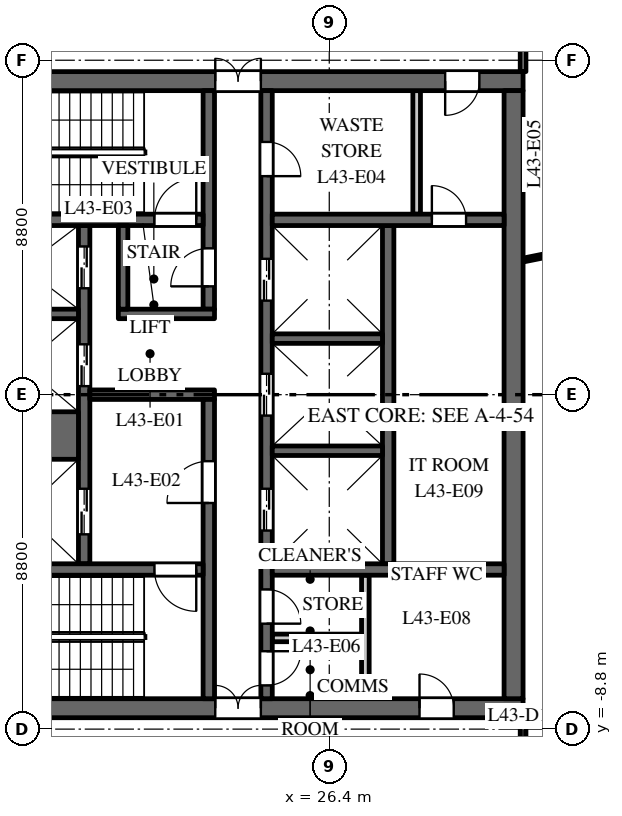
"""IFC4 building model, lengths in metres.
Left out: names, types, materials, properties, quantities, classifications, styles, units other than length and angle.
Written with IfcOpenShell. Run it as: python <this file> out.ifc"""

import sys

from ifc_helpers import new_model, si_unit, direction, frame, frame_2d, origin, place, context, subcontext, project, spatial, rectangle, extrude, element, fill, save


model = new_model("IFC4")
c1 = context("Model", 3, precision=1e-05, world=origin(), true_north=direction((0.0, 1.0)))
c2 = subcontext(c1, "Body", "Model", "MODEL_VIEW")
j1 = project(units=[si_unit("LENGTHUNIT", "METRE"), si_unit("PLANEANGLEUNIT", "RADIAN")], contexts=[c1])
p1 = place(None, origin())
s1 = spatial("IfcSite", under=j1, at=p1, CompositionType="ELEMENT")
p2 = place(p1, origin())
s2 = spatial("IfcBuilding", under=s1, at=p2, CompositionType="ELEMENT")
p3 = place(p2, frame((0.0, 0.0, 186.0)))
s3 = spatial("IfcBuildingStorey", under=s2, at=p3, CompositionType="ELEMENT", Elevation=186.0)
p4 = place(p3, frame((16.5, 8.25, 0.0), z_axis=(0.0, 0.0, 1.0), x_axis=(1.0, 0.0, 0.0)))
e1 = element("IfcWall", 1, at=p4, inside=s3, PredefinedType="SHEAR", context=c2, shape_type="SweptSolid", body=[
    extrude(rectangle(XDim=15.0, YDim=0.5, at=frame_2d((7.5, 0.0))), origin(), (0.0, 0.0, 1.0), 3.7),
])
p5 = place(p4, frame((6.9, 0.0, 0.0)))
e2 = element("IfcOpeningElement", 2, at=p5, cuts=e1, PredefinedType="OPENING", context=c2, shape_type="SweptSolid", body=[
    extrude(rectangle(XDim=1.2, YDim=2.1, at=frame_2d((0.6, 1.05))), frame((0.0, 0.26, 0.0), z_axis=(0.0, -1.0, 0.0), x_axis=(1.0, 0.0, 0.0)), (0.0, 0.0, 1.0), 0.52),
])
p6 = place(p4, frame((12.95, 0.0, 0.0)))
e3 = element("IfcOpeningElement", 3, at=p6, cuts=e1, PredefinedType="OPENING", context=c2, shape_type="SweptSolid", body=[
    extrude(rectangle(XDim=0.9, YDim=2.1, at=frame_2d((0.45, 1.05))), frame((0.0, 0.26, 0.0), z_axis=(0.0, -1.0, 0.0), x_axis=(1.0, 0.0, 0.0)), (0.0, 0.0, 1.0), 0.52),
])
p7 = place(p3, frame((16.5, -8.25, 0.0), z_axis=(0.0, 0.0, 1.0), x_axis=(1.0, 0.0, 0.0)))
e4 = element("IfcWall", 4, at=p7, inside=s3, PredefinedType="SHEAR", context=c2, shape_type="SweptSolid", body=[
    extrude(rectangle(XDim=15.0, YDim=0.5, at=frame_2d((7.5, 0.0))), origin(), (0.0, 0.0, 1.0), 3.7),
])
p8 = place(p7, frame((6.9, 0.0, 0.0)))
e5 = element("IfcOpeningElement", 5, at=p8, cuts=e4, PredefinedType="OPENING", context=c2, shape_type="SweptSolid", body=[
    extrude(rectangle(XDim=1.2, YDim=2.1, at=frame_2d((0.6, 1.05))), frame((0.0, 0.26, 0.0), z_axis=(0.0, -1.0, 0.0), x_axis=(1.0, 0.0, 0.0)), (0.0, 0.0, 1.0), 0.52),
])
p9 = place(p7, frame((12.275, 0.0, 0.0)))
e6 = element("IfcOpeningElement", 6, at=p9, cuts=e4, PredefinedType="OPENING", context=c2, shape_type="SweptSolid", body=[
    extrude(rectangle(XDim=0.9, YDim=2.1, at=frame_2d((0.45, 1.05))), frame((0.0, 0.26, 0.0), z_axis=(0.0, -1.0, 0.0), x_axis=(1.0, 0.0, 0.0)), (0.0, 0.0, 1.0), 0.52),
])
p10 = place(p3, frame((27.95, -4.45, 0.0), z_axis=(0.0, 0.0, 1.0), x_axis=(0.0, 1.0, 0.0)))
e7 = element("IfcWall", 7, at=p10, inside=s3, PredefinedType="SHEAR", context=c2, shape_type="SweptSolid", body=[
    extrude(rectangle(XDim=8.9, YDim=0.3, at=frame_2d((4.45, 0.0))), origin(), (0.0, 0.0, 1.0), 3.7),
])
p11 = place(p3, frame((19.95, -4.45, 0.0), z_axis=(0.0, 0.0, 1.0), x_axis=(0.0, 1.0, 0.0)))
e8 = element("IfcWall", 8, at=p11, inside=s3, PredefinedType="SHEAR", context=c2, shape_type="SweptSolid", body=[
    extrude(rectangle(XDim=8.9, YDim=0.3, at=frame_2d((4.45, 0.0))), origin(), (0.0, 0.0, 1.0), 3.7),
])
p12 = place(p11, frame((0.775, 0.0, 0.0)))
e9 = element("IfcOpeningElement", 9, at=p12, cuts=e8, PredefinedType="OPENING", context=c2, shape_type="SweptSolid", body=[
    extrude(rectangle(XDim=1.2, YDim=2.1, at=frame_2d((0.6, 1.05))), frame((0.0, 0.16, 0.0), z_axis=(0.0, -1.0, 0.0), x_axis=(1.0, 0.0, 0.0)), (0.0, 0.0, 1.0), 0.32),
])
p13 = place(p11, frame((4.675, 0.0, 0.0)))
e10 = element("IfcOpeningElement", 10, at=p13, cuts=e8, PredefinedType="OPENING", context=c2, shape_type="SweptSolid", body=[
    extrude(rectangle(XDim=1.1, YDim=2.1, at=frame_2d((0.55, 1.05))), frame((0.0, 0.16, 0.0), z_axis=(0.0, -1.0, 0.0), x_axis=(1.0, 0.0, 0.0)), (0.0, 0.0, 1.0), 0.32),
])
p14 = place(p11, frame((7.25, 0.0, 0.0)))
e11 = element("IfcOpeningElement", 11, at=p14, cuts=e8, PredefinedType="OPENING", context=c2, shape_type="SweptSolid", body=[
    extrude(rectangle(XDim=1.1, YDim=2.1, at=frame_2d((0.55, 1.05))), frame((0.0, 0.16, 0.0), z_axis=(0.0, -1.0, 0.0), x_axis=(1.0, 0.0, 0.0)), (0.0, 0.0, 1.0), 0.32),
])
p15 = place(p3, frame((24.75, -8.0, 0.0), z_axis=(0.0, 0.0, 1.0), x_axis=(0.0, 1.0, 0.0)))
e12 = element("IfcWall", 12, at=p15, inside=s3, PredefinedType="SHEAR", context=c2, shape_type="SweptSolid", body=[
    extrude(rectangle(XDim=16.0, YDim=0.3, at=frame_2d((8.0, 0.0))), origin(), (0.0, 0.0, 1.0), 3.7),
])
p16 = place(p15, frame((4.425, 0.0, 0.0)))
e13 = element("IfcOpeningElement", 13, at=p16, cuts=e12, PredefinedType="OPENING", context=c2, shape_type="SweptSolid", body=[
    extrude(rectangle(XDim=1.1, YDim=2.1, at=frame_2d((0.55, 1.05))), frame((0.0, 0.16, 0.0), z_axis=(0.0, -1.0, 0.0), x_axis=(1.0, 0.0, 0.0)), (0.0, 0.0, 1.0), 0.32),
])
p17 = place(p15, frame((7.45, 0.0, 0.0)))
e14 = element("IfcOpeningElement", 14, at=p17, cuts=e12, PredefinedType="OPENING", context=c2, shape_type="SweptSolid", body=[
    extrude(rectangle(XDim=1.1, YDim=2.1, at=frame_2d((0.55, 1.05))), frame((0.0, 0.16, 0.0), z_axis=(0.0, -1.0, 0.0), x_axis=(1.0, 0.0, 0.0)), (0.0, 0.0, 1.0), 0.32),
])
p18 = place(p15, frame((10.475, 0.0, 0.0)))
e15 = element("IfcOpeningElement", 15, at=p18, cuts=e12, PredefinedType="OPENING", context=c2, shape_type="SweptSolid", body=[
    extrude(rectangle(XDim=1.1, YDim=2.1, at=frame_2d((0.55, 1.05))), frame((0.0, 0.16, 0.0), z_axis=(0.0, -1.0, 0.0), x_axis=(1.0, 0.0, 0.0)), (0.0, 0.0, 1.0), 0.32),
])
p19 = place(p15, frame((13.75, 0.0, 0.0)))
e16 = element("IfcOpeningElement", 16, at=p19, cuts=e12, PredefinedType="OPENING", context=c2, shape_type="SweptSolid", body=[
    extrude(rectangle(XDim=0.9, YDim=2.1, at=frame_2d((0.45, 1.05))), frame((0.0, 0.16, 0.0), z_axis=(0.0, -1.0, 0.0), x_axis=(1.0, 0.0, 0.0)), (0.0, 0.0, 1.0), 0.32),
])
p20 = place(p15, frame((1.975, 0.0, 0.0)))
e17 = element("IfcOpeningElement", 17, at=p20, cuts=e12, PredefinedType="OPENING", context=c2, shape_type="SweptSolid", body=[
    extrude(rectangle(XDim=0.9, YDim=2.1, at=frame_2d((0.45, 1.05))), frame((0.0, 0.16, 0.0), z_axis=(0.0, -1.0, 0.0), x_axis=(1.0, 0.0, 0.0)), (0.0, 0.0, 1.0), 0.32),
])
p21 = place(p15, frame((0.35, 0.0, 0.0)))
e18 = element("IfcOpeningElement", 18, at=p21, cuts=e12, PredefinedType="OPENING", context=c2, shape_type="SweptSolid", body=[
    extrude(rectangle(XDim=0.9, YDim=2.1, at=frame_2d((0.45, 1.05))), frame((0.0, 0.16, 0.0), z_axis=(0.0, -1.0, 0.0), x_axis=(1.0, 0.0, 0.0)), (0.0, 0.0, 1.0), 0.32),
])
p22 = place(p3, frame((20.1, 0.0, 0.0), z_axis=(0.0, 0.0, 1.0), x_axis=(1.0, 0.0, 0.0)))
e19 = element("IfcWall", 19, at=p22, inside=s3, PredefinedType="SHEAR", context=c2, shape_type="SweptSolid", body=[
    extrude(rectangle(XDim=3.28, YDim=0.25, at=frame_2d((1.64, 0.0))), origin(), (0.0, 0.0, 1.0), 3.7),
])
p23 = place(p3, frame((31.25, -8.0, 0.0), z_axis=(0.0, 0.0, 1.0), x_axis=(0.0, 1.0, 0.0)))
e20 = element("IfcWall", 20, at=p23, inside=s3, PredefinedType="SHEAR", context=c2, shape_type="SweptSolid", body=[
    extrude(rectangle(XDim=16.0, YDim=0.5, at=frame_2d((8.0, 0.0))), origin(), (0.0, 0.0, 1.0), 3.7),
])
p24 = place(p3, frame((24.9, 4.6, 0.0), z_axis=(0.0, 0.0, 1.0), x_axis=(1.0, 0.0, 0.0)))
e21 = element("IfcWall", 21, at=p24, inside=s3, PredefinedType="SHEAR", context=c2, shape_type="SweptSolid", body=[
    extrude(rectangle(XDim=6.1, YDim=0.3, at=frame_2d((3.05, 0.0))), origin(), (0.0, 0.0, 1.0), 3.7),
])
p25 = place(p24, frame((4.2, 0.0, 0.0)))
e22 = element("IfcOpeningElement", 22, at=p25, cuts=e21, PredefinedType="OPENING", context=c2, shape_type="SweptSolid", body=[
    extrude(rectangle(XDim=0.9, YDim=2.1, at=frame_2d((0.45, 1.05))), frame((0.0, 0.16, 0.0), z_axis=(0.0, -1.0, 0.0), x_axis=(1.0, 0.0, 0.0)), (0.0, 0.0, 1.0), 0.32),
])
for number, where, z_axis, x_axis in (
    (23, (28.7, 4.75, 0.0), (0.0, 0.0, 1.0), (0.0, 1.0, 0.0)),
    (24, (27.35, -8.0, 0.0), (0.0, 0.0, 1.0), (0.0, 1.0, 0.0)),
):
    element("IfcWall", number, at=place(p3, frame(where, z_axis=z_axis, x_axis=x_axis)), inside=s3, PredefinedType="PARTITIONING", context=c2, shape_type="SweptSolid", body=[
        extrude(rectangle(XDim=3.25, YDim=0.2, at=frame_2d((1.625, 0.0))), origin(), (0.0, 0.0, 1.0), 3.7),
    ])
p26 = place(p3, frame((24.9, -6.4, 0.0), z_axis=(0.0, 0.0, 1.0), x_axis=(1.0, 0.0, 0.0)))
e25 = element("IfcWall", 25, at=p26, inside=s3, PredefinedType="PARTITIONING", context=c2, shape_type="SweptSolid", body=[
    extrude(rectangle(XDim=2.35, YDim=0.2, at=frame_2d((1.175, 0.0))), origin(), (0.0, 0.0, 1.0), 3.7),
])
p27 = place(p3, frame((24.9, -4.6, 0.0), z_axis=(0.0, 0.0, 1.0), x_axis=(1.0, 0.0, 0.0)))
e26 = element("IfcWall", 26, at=p27, inside=s3, PredefinedType="SHEAR", context=c2, shape_type="SweptSolid", body=[
    extrude(rectangle(XDim=6.1, YDim=0.3, at=frame_2d((3.05, 0.0))), origin(), (0.0, 0.0, 1.0), 3.7),
])
p28 = place(p3, frame((16.9, -1.075, 0.0), z_axis=(0.0, 0.0, 1.0), x_axis=(1.0, 0.0, 0.0)))
e27 = element("IfcWall", 27, at=p28, inside=s3, PredefinedType="SHEAR", context=c2, shape_type="SweptSolid", body=[
    extrude(rectangle(XDim=2.9, YDim=1.25, at=frame_2d((1.45, 0.0))), origin(), (0.0, 0.0, 1.0), 3.7),
])
for number, where, z_axis, x_axis in (
    (28, (16.9, 2.125, 0.0), (0.0, 0.0, 1.0), (1.0, 0.0, 0.0)),
    (29, (24.9, -1.475, 0.0), (0.0, 0.0, 1.0), (1.0, 0.0, 0.0)),
    (30, (24.9, 1.475, 0.0), (0.0, 0.0, 1.0), (1.0, 0.0, 0.0)),
):
    element("IfcWall", number, at=place(p3, frame(where, z_axis=z_axis, x_axis=x_axis)), inside=s3, PredefinedType="SHEAR", context=c2, shape_type="SweptSolid", body=[
        extrude(rectangle(XDim=2.9, YDim=0.25, at=frame_2d((1.45, 0.0))), origin(), (0.0, 0.0, 1.0), 3.7),
    ])
p29 = place(p3, frame((23.23, 2.25, 0.0), z_axis=(0.0, 0.0, 1.0), x_axis=(0.0, 1.0, 0.0)))
e31 = element("IfcWall", 31, at=p29, inside=s3, PredefinedType="SHEAR", context=c2, shape_type="SweptSolid", body=[
    extrude(rectangle(XDim=5.75, YDim=0.3, at=frame_2d((2.875, 0.0))), origin(), (0.0, 0.0, 1.0), 3.7),
])
p30 = place(p29, frame((0.6, 0.0, 0.0)))
e32 = element("IfcOpeningElement", 32, at=p30, cuts=e31, PredefinedType="OPENING", context=c2, shape_type="SweptSolid", body=[
    extrude(rectangle(XDim=1.0, YDim=2.1, at=frame_2d((0.5, 1.05))), frame((0.0, 0.16, 0.0), z_axis=(0.0, -1.0, 0.0), x_axis=(1.0, 0.0, 0.0)), (0.0, 0.0, 1.0), 0.32),
])
p31 = place(p3, frame((23.23, -8.0, 0.0), z_axis=(0.0, 0.0, 1.0), x_axis=(0.0, 1.0, 0.0)))
e33 = element("IfcWall", 33, at=p31, inside=s3, PredefinedType="SHEAR", context=c2, shape_type="SweptSolid", body=[
    extrude(rectangle(XDim=7.875, YDim=0.3, at=frame_2d((3.938, 0.0))), origin(), (0.0, 0.0, 1.0), 3.7),
])
p32 = place(p31, frame((5.15, 0.0, 0.0)))
e34 = element("IfcOpeningElement", 34, at=p32, cuts=e33, PredefinedType="OPENING", context=c2, shape_type="SweptSolid", body=[
    extrude(rectangle(XDim=1.1, YDim=2.1, at=frame_2d((0.55, 1.05))), frame((0.0, 0.16, 0.0), z_axis=(0.0, -1.0, 0.0), x_axis=(1.0, 0.0, 0.0)), (0.0, 0.0, 1.0), 0.32),
])
p33 = place(p3, frame((16.9, 4.6, 0.0), z_axis=(0.0, 0.0, 1.0), x_axis=(1.0, 0.0, 0.0)))
e35 = element("IfcWall", 35, at=p33, inside=s3, PredefinedType="SHEAR", context=c2, shape_type="SweptSolid", body=[
    extrude(rectangle(XDim=6.18, YDim=0.3, at=frame_2d((3.09, 0.0))), origin(), (0.0, 0.0, 1.0), 3.7),
])
p34 = place(p33, frame((4.9, 0.0, 0.0)))
e36 = element("IfcOpeningElement", 36, at=p34, cuts=e35, PredefinedType="OPENING", context=c2, shape_type="SweptSolid", body=[
    extrude(rectangle(XDim=1.1, YDim=2.1, at=frame_2d((0.55, 1.05))), frame((0.0, 0.16, 0.0), z_axis=(0.0, -1.0, 0.0), x_axis=(1.0, 0.0, 0.0)), (0.0, 0.0, 1.0), 0.32),
])
p35 = place(p3, frame((16.9, -4.6, 0.0), z_axis=(0.0, 0.0, 1.0), x_axis=(1.0, 0.0, 0.0)))
e37 = element("IfcWall", 37, at=p35, inside=s3, PredefinedType="SHEAR", context=c2, shape_type="SweptSolid", body=[
    extrude(rectangle(XDim=6.18, YDim=0.3, at=frame_2d((3.09, 0.0))), origin(), (0.0, 0.0, 1.0), 3.7),
])
p36 = place(p35, frame((4.9, 0.0, 0.0)))
e38 = element("IfcOpeningElement", 38, at=p36, cuts=e37, PredefinedType="OPENING", context=c2, shape_type="SweptSolid", body=[
    extrude(rectangle(XDim=1.1, YDim=2.1, at=frame_2d((0.55, 1.05))), frame((0.0, 0.16, 0.0), z_axis=(0.0, -1.0, 0.0), x_axis=(1.0, 0.0, 0.0)), (0.0, 0.0, 1.0), 0.32),
])
p37 = place(p3, frame((20.85, 2.125, 0.0), z_axis=(0.0, 0.0, 1.0), x_axis=(1.0, 0.0, 0.0)))
e39 = element("IfcWall", 39, at=p37, inside=s3, PredefinedType="SHEAR", context=c2, shape_type="SweptSolid", body=[
    extrude(rectangle(XDim=2.53, YDim=0.25, at=frame_2d((1.265, 0.0))), origin(), (0.0, 0.0, 1.0), 3.7),
])
p38 = place(p3, frame((20.975, 2.25, 0.0), z_axis=(0.0, 0.0, 1.0), x_axis=(0.0, 1.0, 0.0)))
e40 = element("IfcWall", 40, at=p38, inside=s3, PredefinedType="SHEAR", context=c2, shape_type="SweptSolid", body=[
    extrude(rectangle(XDim=2.2, YDim=0.25, at=frame_2d((1.1, 0.0))), origin(), (0.0, 0.0, 1.0), 3.7),
])
p39 = place(p3, frame((14.317, -8.236, 0.0), z_axis=(0.0, 0.0, 1.0), x_axis=(0.542334368531, -0.840162741801, 0.0)))
e41 = element("IfcWall", 41, at=p39, inside=s3, PredefinedType="PARTITIONING", context=c2, shape_type="SweptSolid", body=[
    extrude(rectangle(XDim=15.837, YDim=0.1, at=frame_2d((7.919, 0.0))), origin(), (0.0, 0.0, 1.0), 3.7),
])
p40 = place(p3, frame((31.5, -10.7, 0.0), z_axis=(0.0, 0.0, 1.0), x_axis=(0.0, 1.0, 0.0)))
e42 = element("IfcWall", 42, at=p40, inside=s3, PredefinedType="PARTITIONING", context=c2, shape_type="SweptSolid", body=[
    extrude(rectangle(XDim=2.2, YDim=0.15, at=frame_2d((1.1, 0.0))), origin(), (0.0, 0.0, 1.0), 2.9),
])
p41 = place(p40, frame((0.65, 0.0, 0.0)))
e43 = element("IfcOpeningElement", 43, at=p41, cuts=e42, PredefinedType="OPENING", context=c2, shape_type="SweptSolid", body=[
    extrude(rectangle(XDim=1.0, YDim=2.1, at=frame_2d((0.5, 1.05))), frame((0.0, 0.085, 0.0), z_axis=(0.0, -1.0, 0.0), x_axis=(1.0, 0.0, 0.0)), (0.0, 0.0, 1.0), 0.17),
])
p42 = place(p3, frame((31.5, 3.542, 0.0), z_axis=(0.0, 0.0, 1.0), x_axis=(0.980357474535, 0.197228857227, 0.0)))
e44 = element("IfcWall", 44, at=p42, inside=s3, PredefinedType="PARTITIONING", context=c2, shape_type="SweptSolid", body=[
    extrude(rectangle(XDim=4.092, YDim=0.1, at=frame_2d((2.046, 0.0))), origin(), (0.0, 0.0, 1.0), 2.9),
])
p43 = place(p3, frame((31.5, 8.5, 0.0), z_axis=(0.0, 0.0, 1.0), x_axis=(0.0, 1.0, 0.0)))
e45 = element("IfcWall", 45, at=p43, inside=s3, PredefinedType="PARTITIONING", context=c2, shape_type="SweptSolid", body=[
    extrude(rectangle(XDim=2.2, YDim=0.15, at=frame_2d((1.1, 0.0))), origin(), (0.0, 0.0, 1.0), 2.9),
])
p44 = place(p12, origin())
e46 = element("IfcDoor", 46, at=p44, inside=s3, OperationType="DOUBLE_DOOR_SLIDING", PredefinedType="DOOR", context=c2, shape_type="SweptSolid", body=[
    extrude(rectangle(XDim=1.2, YDim=2.1, at=frame_2d((0.6, 1.05))), frame((0.0, 0.025, 0.0), z_axis=(0.0, -1.0, 0.0), x_axis=(1.0, 0.0, 0.0)), (0.0, 0.0, 1.0), 0.05),
])
fill(e9, e46)
p45 = place(p13, origin())
e47 = element("IfcDoor", 47, at=p45, inside=s3, OperationType="DOUBLE_DOOR_SLIDING", PredefinedType="DOOR", context=c2, shape_type="SweptSolid", body=[
    extrude(rectangle(XDim=1.1, YDim=2.1, at=frame_2d((0.55, 1.05))), frame((0.0, 0.025, 0.0), z_axis=(0.0, -1.0, 0.0), x_axis=(1.0, 0.0, 0.0)), (0.0, 0.0, 1.0), 0.05),
])
fill(e10, e47)
p46 = place(p14, origin())
e48 = element("IfcDoor", 48, at=p46, inside=s3, OperationType="DOUBLE_DOOR_SLIDING", PredefinedType="DOOR", context=c2, shape_type="SweptSolid", body=[
    extrude(rectangle(XDim=1.1, YDim=2.1, at=frame_2d((0.55, 1.05))), frame((0.0, 0.025, 0.0), z_axis=(0.0, -1.0, 0.0), x_axis=(1.0, 0.0, 0.0)), (0.0, 0.0, 1.0), 0.05),
])
fill(e11, e48)
p47 = place(p16, origin())
e49 = element("IfcDoor", 49, at=p47, inside=s3, OperationType="DOUBLE_DOOR_SLIDING", PredefinedType="DOOR", context=c2, shape_type="SweptSolid", body=[
    extrude(rectangle(XDim=1.1, YDim=2.1, at=frame_2d((0.55, 1.05))), frame((0.0, 0.025, 0.0), z_axis=(0.0, -1.0, 0.0), x_axis=(1.0, 0.0, 0.0)), (0.0, 0.0, 1.0), 0.05),
])
fill(e13, e49)
p48 = place(p17, origin())
e50 = element("IfcDoor", 50, at=p48, inside=s3, OperationType="DOUBLE_DOOR_SLIDING", PredefinedType="DOOR", context=c2, shape_type="SweptSolid", body=[
    extrude(rectangle(XDim=1.1, YDim=2.1, at=frame_2d((0.55, 1.05))), frame((0.0, 0.025, 0.0), z_axis=(0.0, -1.0, 0.0), x_axis=(1.0, 0.0, 0.0)), (0.0, 0.0, 1.0), 0.05),
])
fill(e14, e50)
p49 = place(p18, origin())
e51 = element("IfcDoor", 51, at=p49, inside=s3, OperationType="DOUBLE_DOOR_SLIDING", PredefinedType="DOOR", context=c2, shape_type="SweptSolid", body=[
    extrude(rectangle(XDim=1.1, YDim=2.1, at=frame_2d((0.55, 1.05))), frame((0.0, 0.025, 0.0), z_axis=(0.0, -1.0, 0.0), x_axis=(1.0, 0.0, 0.0)), (0.0, 0.0, 1.0), 0.05),
])
fill(e15, e51)
p50 = place(p34, origin())
e52 = element("IfcDoor", 52, at=p50, inside=s3, OperationType="SINGLE_SWING_LEFT", PredefinedType="DOOR", context=c2, shape_type="SweptSolid", body=[
    extrude(rectangle(XDim=1.1, YDim=2.1, at=frame_2d((0.55, 1.05))), frame((0.0, 0.025, 0.0), z_axis=(0.0, -1.0, 0.0), x_axis=(1.0, 0.0, 0.0)), (0.0, 0.0, 1.0), 0.05),
])
fill(e36, e52)
p51 = place(p36, origin())
e53 = element("IfcDoor", 53, at=p51, inside=s3, OperationType="SINGLE_SWING_RIGHT", PredefinedType="DOOR", context=c2, shape_type="SweptSolid", body=[
    extrude(rectangle(XDim=1.1, YDim=2.1, at=frame_2d((0.55, 1.05))), frame((0.0, 0.025, 0.0), z_axis=(0.0, -1.0, 0.0), x_axis=(1.0, 0.0, 0.0)), (0.0, 0.0, 1.0), 0.05),
])
fill(e38, e53)
p52 = place(p32, origin())
e54 = element("IfcDoor", 54, at=p52, inside=s3, OperationType="SINGLE_SWING_RIGHT", PredefinedType="DOOR", context=c2, shape_type="SweptSolid", body=[
    extrude(rectangle(XDim=1.1, YDim=2.1, at=frame_2d((0.55, 1.05))), frame((0.0, 0.025, 0.0), z_axis=(0.0, -1.0, 0.0), x_axis=(1.0, 0.0, 0.0)), (0.0, 0.0, 1.0), 0.05),
])
fill(e34, e54)
p53 = place(p30, origin())
e55 = element("IfcDoor", 55, at=p53, inside=s3, OperationType="SINGLE_SWING_RIGHT", PredefinedType="DOOR", context=c2, shape_type="SweptSolid", body=[
    extrude(rectangle(XDim=1.0, YDim=2.1, at=frame_2d((0.5, 1.05))), frame((0.0, 0.025, 0.0), z_axis=(0.0, -1.0, 0.0), x_axis=(1.0, 0.0, 0.0)), (0.0, 0.0, 1.0), 0.05),
])
fill(e32, e55)
p54 = place(p5, origin())
e56 = element("IfcDoor", 56, at=p54, inside=s3, OperationType="DOUBLE_DOOR_DOUBLE_SWING", PredefinedType="DOOR", context=c2, shape_type="SweptSolid", body=[
    extrude(rectangle(XDim=1.2, YDim=2.1, at=frame_2d((0.6, 1.05))), frame((0.0, 0.025, 0.0), z_axis=(0.0, -1.0, 0.0), x_axis=(1.0, 0.0, 0.0)), (0.0, 0.0, 1.0), 0.05),
])
fill(e2, e56)
p55 = place(p8, origin())
e57 = element("IfcDoor", 57, at=p55, inside=s3, OperationType="DOUBLE_DOOR_DOUBLE_SWING", PredefinedType="DOOR", context=c2, shape_type="SweptSolid", body=[
    extrude(rectangle(XDim=1.2, YDim=2.1, at=frame_2d((0.6, 1.05))), frame((0.0, 0.025, 0.0), z_axis=(0.0, -1.0, 0.0), x_axis=(1.0, 0.0, 0.0)), (0.0, 0.0, 1.0), 0.05),
])
fill(e5, e57)
p56 = place(p19, origin())
e58 = element("IfcDoor", 58, at=p56, inside=s3, OperationType="SINGLE_SWING_LEFT", PredefinedType="DOOR", context=c2, shape_type="SweptSolid", body=[
    extrude(rectangle(XDim=0.9, YDim=2.1, at=frame_2d((0.45, 1.05))), frame((0.0, 0.025, 0.0), z_axis=(0.0, -1.0, 0.0), x_axis=(1.0, 0.0, 0.0)), (0.0, 0.0, 1.0), 0.05),
])
fill(e16, e58)
p57 = place(p6, origin())
e59 = element("IfcDoor", 59, at=p57, inside=s3, OperationType="SINGLE_SWING_LEFT", PredefinedType="DOOR", context=c2, shape_type="SweptSolid", body=[
    extrude(rectangle(XDim=0.9, YDim=2.1, at=frame_2d((0.45, 1.05))), frame((0.0, 0.025, 0.0), z_axis=(0.0, -1.0, 0.0), x_axis=(1.0, 0.0, 0.0)), (0.0, 0.0, 1.0), 0.05),
])
fill(e3, e59)
p58 = place(p20, origin())
e60 = element("IfcDoor", 60, at=p58, inside=s3, OperationType="SINGLE_SWING_LEFT", PredefinedType="DOOR", context=c2, shape_type="SweptSolid", body=[
    extrude(rectangle(XDim=0.9, YDim=2.1, at=frame_2d((0.45, 1.05))), frame((0.0, 0.025, 0.0), z_axis=(0.0, -1.0, 0.0), x_axis=(1.0, 0.0, 0.0)), (0.0, 0.0, 1.0), 0.05),
])
fill(e17, e60)
p59 = place(p21, origin())
e61 = element("IfcDoor", 61, at=p59, inside=s3, OperationType="SINGLE_SWING_RIGHT", PredefinedType="DOOR", context=c2, shape_type="SweptSolid", body=[
    extrude(rectangle(XDim=0.9, YDim=2.1, at=frame_2d((0.45, 1.05))), frame((0.0, 0.025, 0.0), z_axis=(0.0, -1.0, 0.0), x_axis=(1.0, 0.0, 0.0)), (0.0, 0.0, 1.0), 0.05),
])
fill(e18, e61)
p60 = place(p9, origin())
e62 = element("IfcDoor", 62, at=p60, inside=s3, OperationType="SINGLE_SWING_RIGHT", PredefinedType="DOOR", context=c2, shape_type="SweptSolid", body=[
    extrude(rectangle(XDim=0.9, YDim=2.1, at=frame_2d((0.45, 1.05))), frame((0.0, 0.025, 0.0), z_axis=(0.0, -1.0, 0.0), x_axis=(1.0, 0.0, 0.0)), (0.0, 0.0, 1.0), 0.05),
])
fill(e6, e62)
p61 = place(p25, origin())
e63 = element("IfcDoor", 63, at=p61, inside=s3, OperationType="SINGLE_SWING_RIGHT", PredefinedType="DOOR", context=c2, shape_type="SweptSolid", body=[
    extrude(rectangle(XDim=0.9, YDim=2.1, at=frame_2d((0.45, 1.05))), frame((0.0, 0.025, 0.0), z_axis=(0.0, -1.0, 0.0), x_axis=(1.0, 0.0, 0.0)), (0.0, 0.0, 1.0), 0.05),
])
fill(e22, e63)
save(model, sys.argv[1])
